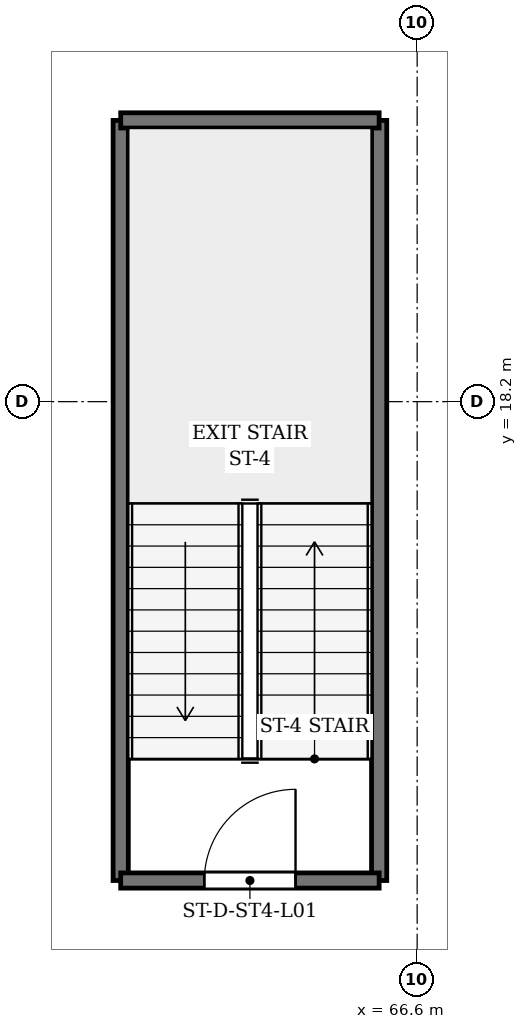
"""IFC4 building model, lengths in metres.
Left out: names, types, materials, properties, quantities, classifications, styles, units other than length and angle.
Written with IfcOpenShell. Run it as: python <this file> out.ifc"""

import sys

from ifc_helpers import new_model, si_unit, direction, frame, frame_2d, origin, place, context, subcontext, project, spatial, rectangle, extrude, source, transform, mapped, element, fill, save


model = new_model("IFC4")
c1 = context("Model", 3, precision=1e-05, world=origin(), true_north=direction((0.0, 1.0)))
c2 = subcontext(c1, "Body", "Model", "MODEL_VIEW")
j1 = project(units=[si_unit("LENGTHUNIT", "METRE"), si_unit("PLANEANGLEUNIT", "RADIAN")], contexts=[c1])
p1 = place(None, origin())
s1 = spatial("IfcSite", under=j1, at=p1, CompositionType="ELEMENT")
p2 = place(p1, origin())
s2 = spatial("IfcBuilding", under=s1, at=p2, CompositionType="ELEMENT")
p3 = place(p2, frame((0.0, 0.0, 5.2)))
s3 = spatial("IfcBuildingStorey", under=s2, at=p3, CompositionType="ELEMENT", Elevation=5.2)
for number, where, z_axis, x_axis in (
    (1, (62.7, 11.9, 0.0), (0.0, 0.0, 1.0), (0.0, 1.0, 0.0)),
    (2, (66.1, 11.9, 0.0), (0.0, 0.0, 1.0), (0.0, 1.0, 0.0)),
):
    element("IfcWall", number, at=place(p3, frame(where, z_axis=z_axis, x_axis=x_axis)), inside=s3, PredefinedType="SHEAR", context=c2, shape_type="SweptSolid", body=[
        extrude(rectangle(XDim=10.0, YDim=0.2, at=frame_2d((5.0, 0.0))), origin(), (0.0, 0.0, 1.0), 4.2),
    ])
p4 = place(p3, frame((62.7, 11.9, 0.0), z_axis=(0.0, 0.0, 1.0), x_axis=(1.0, 0.0, 0.0)))
e3 = element("IfcWall", 3, at=p4, inside=s3, PredefinedType="SHEAR", context=c2, shape_type="SweptSolid", body=[
    extrude(rectangle(XDim=3.4, YDim=0.2, at=frame_2d((1.7, 0.0))), origin(), (0.0, 0.0, 1.0), 4.2),
])
p5 = place(p4, frame((1.1, 0.0, 0.0)))
e4 = element("IfcOpeningElement", 4, at=p5, cuts=e3, PredefinedType="OPENING", context=c2, shape_type="SweptSolid", body=[
    extrude(rectangle(XDim=1.2, YDim=2.15, at=frame_2d((0.6, 1.075))), frame((0.0, 0.11, 0.0), z_axis=(0.0, -1.0, 0.0), x_axis=(1.0, 0.0, 0.0)), (0.0, 0.0, 1.0), 0.22),
])
p6 = place(p3, frame((62.7, 21.9, 0.0), z_axis=(0.0, 0.0, 1.0), x_axis=(1.0, 0.0, 0.0)))
e5 = element("IfcWall", 5, at=p6, inside=s3, PredefinedType="SHEAR", context=c2, shape_type="SweptSolid", body=[
    extrude(rectangle(XDim=3.4, YDim=0.2, at=frame_2d((1.7, 0.0))), origin(), (0.0, 0.0, 1.0), 4.2),
])
m1 = source(origin(), c2, "Body", "SweptSolid", [
    extrude(rectangle(XDim=1.2, YDim=2.15, at=frame_2d((0.6, 1.075))), frame((0.0, 0.025, 0.0), z_axis=(0.0, -1.0, 0.0), x_axis=(1.0, 0.0, 0.0)), (0.0, 0.0, 1.0), 0.05),
])
p7 = place(p5, origin())
e6 = element("IfcDoor", 6, at=p7, inside=s3, OperationType="SINGLE_SWING_RIGHT", PredefinedType="DOOR", context=c2, shape_type="MappedRepresentation", body=[
    mapped(m1, transform((0.0, 0.0, 0.0), x_axis=(1.0, 0.0, 0.0), y_axis=(0.0, 1.0, 0.0), z_axis=(0.0, 0.0, 1.0), scale=1.0)),
])
fill(e4, e6)
save(model, sys.argv[1])
